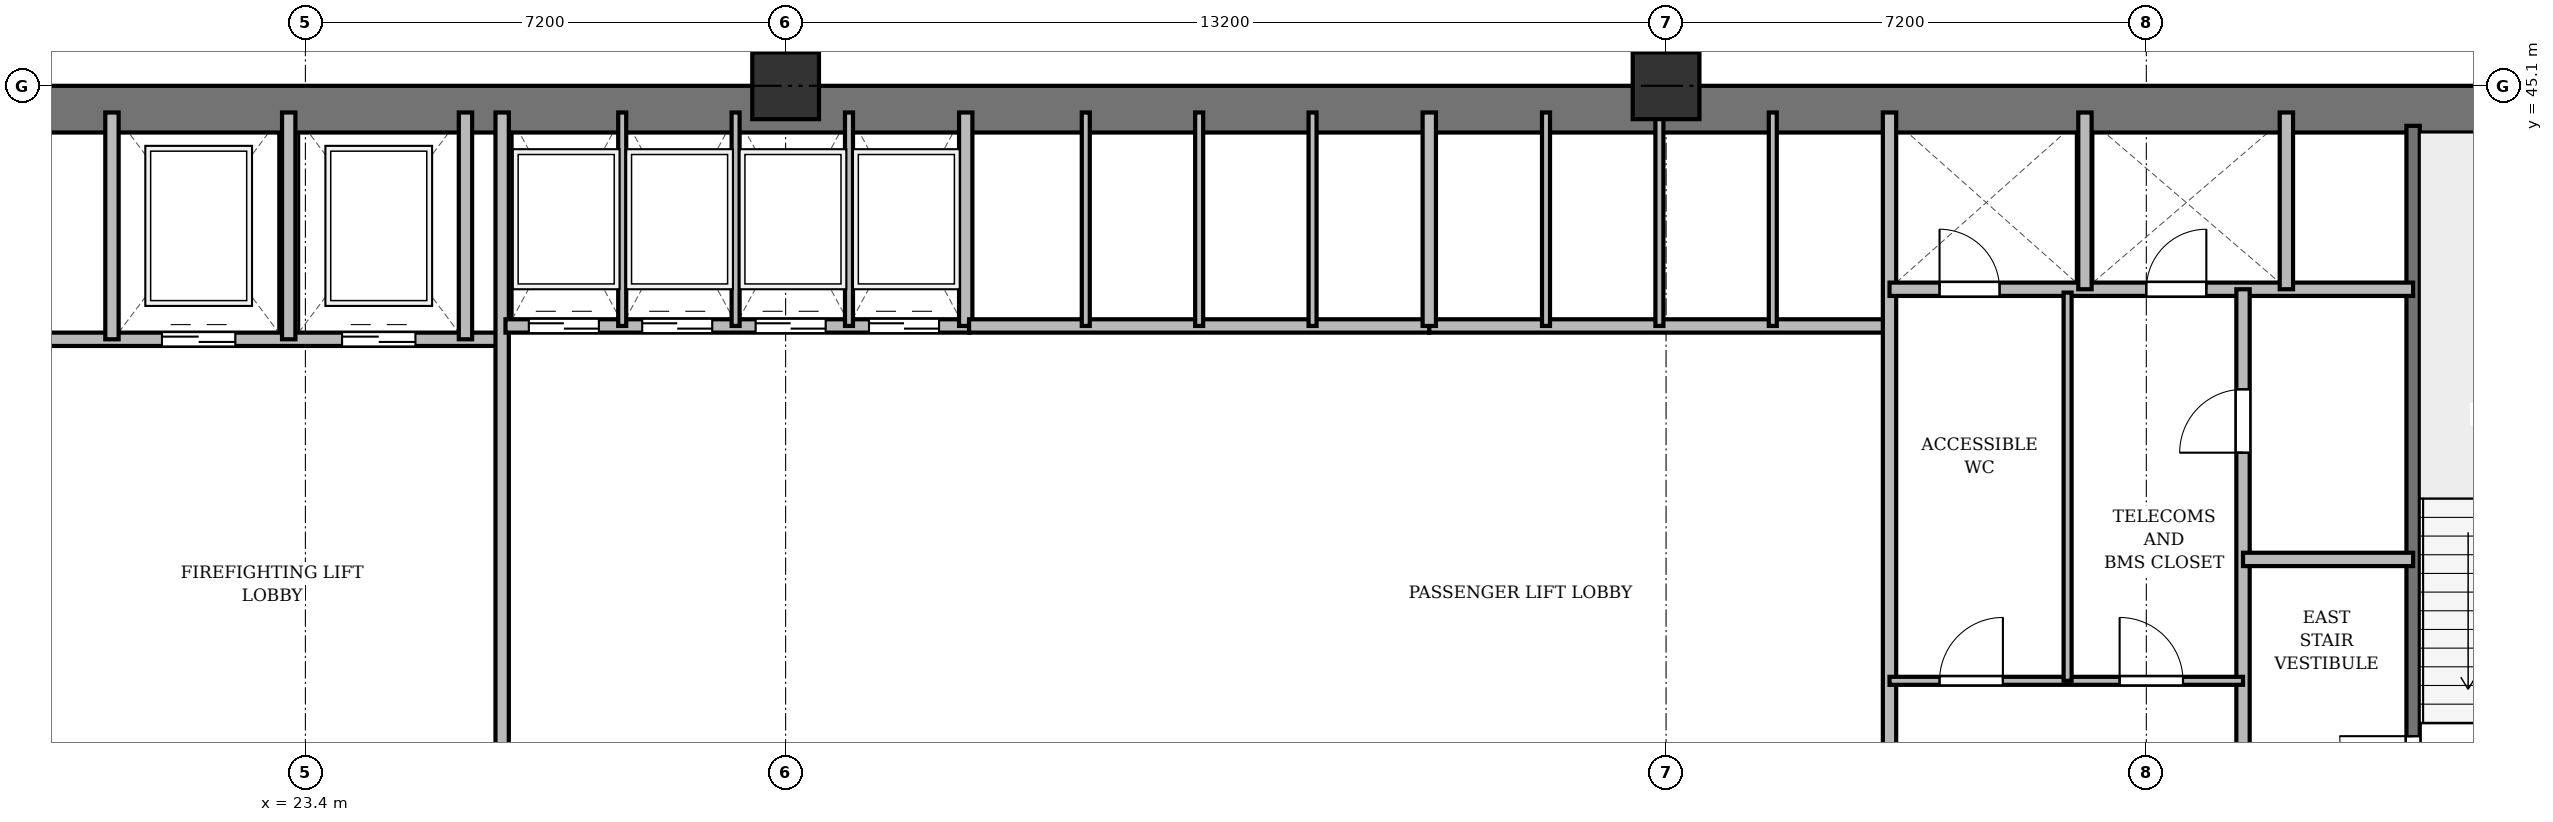
"""IFC4 building model, lengths in metres.
Left out: names, types, materials, properties, quantities, classifications, styles, units other than length and angle.
Written with IfcOpenShell. Run it as: python <this file> out.ifc"""

import sys

from ifc_helpers import new_model, si_unit, direction, frame, frame_2d, origin, origin_2d, place, context, subcontext, project, spatial, rectangle, extrude, source, transform, mapped, element, fill, save


model = new_model("IFC4")
c1 = context("Model", 3, precision=1e-05, world=origin(), true_north=direction((0.0, 1.0)))
c2 = subcontext(c1, "Body", "Model", "MODEL_VIEW")
j1 = project(units=[si_unit("LENGTHUNIT", "METRE"), si_unit("PLANEANGLEUNIT", "RADIAN")], contexts=[c1])
p1 = place(None, origin())
s1 = spatial("IfcSite", under=j1, at=p1, CompositionType="ELEMENT")
p2 = place(p1, origin())
s2 = spatial("IfcBuilding", under=s1, at=p2, CompositionType="ELEMENT")
p3 = place(p2, frame((0.0, 0.0, 14.2)))
s3 = spatial("IfcBuildingStorey", under=s2, at=p3, CompositionType="ELEMENT", Elevation=14.2)
m1 = source(origin(), c2, "Body", "SweptSolid", [
    extrude(rectangle(XDim=1.0, YDim=1.0, at=origin_2d()), origin(), (0.0, 0.0, 1.0), 4.5),
])
for number, where, z_axis, x_axis in (
    (1, (30.6, 45.1, 0.0), (0.0, 0.0, 1.0), (1.0, 0.0, 0.0)),
    (2, (43.8, 45.1, 0.0), (0.0, 0.0, 1.0), (1.0, 0.0, 0.0)),
):
    element("IfcColumn", number, at=place(p3, frame(where, z_axis=z_axis, x_axis=x_axis)), inside=s3, PredefinedType="COLUMN", context=c2, shape_type="MappedRepresentation", body=[
        mapped(m1, transform((0.0, 0.0, 0.0), x_axis=(1.0, 0.0, 0.0), y_axis=(0.0, 1.0, 0.0), z_axis=(0.0, 0.0, 1.0), scale=1.0)),
    ])
p4 = place(p3, frame((15.5, 44.75, 0.0), z_axis=(0.0, 0.0, 1.0), x_axis=(1.0, 0.0, 0.0)))
e3 = element("IfcWall", 3, at=p4, inside=s3, PredefinedType="SHEAR", context=c2, shape_type="SweptSolid", body=[
    extrude(rectangle(XDim=43.4, YDim=0.7, at=frame_2d((21.7, 0.0))), origin(), (0.0, 0.0, 1.0), 4.15),
])
p5 = place(p3, frame((55.0, 33.4, 0.0), z_axis=(0.0, 0.0, 1.0), x_axis=(0.0, 1.0, 0.0)))
e4 = element("IfcWall", 4, at=p5, inside=s3, PredefinedType="SHEAR", context=c2, shape_type="SweptSolid", body=[
    extrude(rectangle(XDim=11.1, YDim=0.2, at=frame_2d((5.55, 0.0))), origin(), (0.0, 0.0, 1.0), 4.15),
])
p6 = place(p5, frame((0.85, 0.0, 0.0)))
e5 = element("IfcOpeningElement", 5, at=p6, cuts=e4, PredefinedType="OPENING", context=c2, shape_type="SweptSolid", body=[
    extrude(rectangle(XDim=1.1, YDim=2.15, at=frame_2d((0.55, 1.075))), frame((0.0, 0.11, 0.0), z_axis=(0.0, -1.0, 0.0), x_axis=(1.0, 0.0, 0.0)), (0.0, 0.0, 1.0), 0.22),
])
p7 = place(p3, frame((19.55, 41.3, 0.0), z_axis=(0.0, 0.0, 1.0), x_axis=(1.0, 0.0, 0.0)))
e6 = element("IfcWall", 6, at=p7, inside=s3, PredefinedType="SOLIDWALL", context=c2, shape_type="SweptSolid", body=[
    extrude(rectangle(XDim=6.75, YDim=0.2, at=frame_2d((3.375, 0.0))), origin(), (0.0, 0.0, 1.0), 4.15),
])
p8 = place(p7, frame((1.7, 0.0, 0.0)))
e7 = element("IfcOpeningElement", 7, at=p8, cuts=e6, PredefinedType="OPENING", context=c2, shape_type="SweptSolid", body=[
    extrude(rectangle(XDim=1.1, YDim=2.15, at=frame_2d((0.55, 1.075))), frame((0.0, 0.11, 0.0), z_axis=(0.0, -1.0, 0.0), x_axis=(1.0, 0.0, 0.0)), (0.0, 0.0, 1.0), 0.22),
])
p9 = place(p7, frame((4.4, 0.0, 0.0)))
e8 = element("IfcOpeningElement", 8, at=p9, cuts=e6, PredefinedType="OPENING", context=c2, shape_type="SweptSolid", body=[
    extrude(rectangle(XDim=1.1, YDim=2.15, at=frame_2d((0.55, 1.075))), frame((0.0, 0.11, 0.0), z_axis=(0.0, -1.0, 0.0), x_axis=(1.0, 0.0, 0.0)), (0.0, 0.0, 1.0), 0.22),
])
for number, where, z_axis, x_axis in (
    (9, (20.5, 41.3, 0.0), (0.0, 0.0, 1.0), (0.0, 1.0, 0.0)),
    (10, (23.15, 41.3, 0.0), (0.0, 0.0, 1.0), (0.0, 1.0, 0.0)),
    (11, (25.8, 41.3, 0.0), (0.0, 0.0, 1.0), (0.0, 1.0, 0.0)),
):
    element("IfcWall", number, at=place(p3, frame(where, z_axis=z_axis, x_axis=x_axis)), inside=s3, PredefinedType="SOLIDWALL", context=c2, shape_type="SweptSolid", body=[
        extrude(rectangle(XDim=3.4, YDim=0.2, at=frame_2d((1.7, 0.0))), origin(), (0.0, 0.0, 1.0), 4.15),
    ])
p10 = place(p3, frame((26.35, 33.4, 0.0), z_axis=(0.0, 0.0, 1.0), x_axis=(0.0, 1.0, 0.0)))
e12 = element("IfcWall", 12, at=p10, inside=s3, PredefinedType="SOLIDWALL", context=c2, shape_type="SweptSolid", body=[
    extrude(rectangle(XDim=11.3, YDim=0.2, at=frame_2d((5.65, 0.0))), origin(), (0.0, 0.0, 1.0), 3.05),
])
p11 = place(p3, frame((26.4, 41.5, 0.0), z_axis=(0.0, 0.0, 1.0), x_axis=(1.0, 0.0, 0.0)))
e13 = element("IfcWall", 13, at=p11, inside=s3, PredefinedType="SOLIDWALL", context=c2, shape_type="SweptSolid", body=[
    extrude(rectangle(XDim=6.95, YDim=0.2, at=frame_2d((3.475, 0.0))), origin(), (0.0, 0.0, 1.0), 4.15),
])
p12 = place(p11, frame((0.35, 0.0, 0.0)))
e14 = element("IfcOpeningElement", 14, at=p12, cuts=e13, PredefinedType="OPENING", context=c2, shape_type="SweptSolid", body=[
    extrude(rectangle(XDim=1.05, YDim=2.15, at=frame_2d((0.525, 1.075))), frame((0.0, 0.11, 0.0), z_axis=(0.0, -1.0, 0.0), x_axis=(1.0, 0.0, 0.0)), (0.0, 0.0, 1.0), 0.22),
])
p13 = place(p11, frame((2.05, 0.0, 0.0)))
e15 = element("IfcOpeningElement", 15, at=p13, cuts=e13, PredefinedType="OPENING", context=c2, shape_type="SweptSolid", body=[
    extrude(rectangle(XDim=1.05, YDim=2.15, at=frame_2d((0.525, 1.075))), frame((0.0, 0.11, 0.0), z_axis=(0.0, -1.0, 0.0), x_axis=(1.0, 0.0, 0.0)), (0.0, 0.0, 1.0), 0.22),
])
p14 = place(p11, frame((3.75, 0.0, 0.0)))
e16 = element("IfcOpeningElement", 16, at=p14, cuts=e13, PredefinedType="OPENING", context=c2, shape_type="SweptSolid", body=[
    extrude(rectangle(XDim=1.05, YDim=2.15, at=frame_2d((0.525, 1.075))), frame((0.0, 0.11, 0.0), z_axis=(0.0, -1.0, 0.0), x_axis=(1.0, 0.0, 0.0)), (0.0, 0.0, 1.0), 0.22),
])
p15 = place(p11, frame((5.45, 0.0, 0.0)))
e17 = element("IfcOpeningElement", 17, at=p15, cuts=e13, PredefinedType="OPENING", context=c2, shape_type="SweptSolid", body=[
    extrude(rectangle(XDim=1.05, YDim=2.15, at=frame_2d((0.525, 1.075))), frame((0.0, 0.11, 0.0), z_axis=(0.0, -1.0, 0.0), x_axis=(1.0, 0.0, 0.0)), (0.0, 0.0, 1.0), 0.22),
])
p16 = place(p3, frame((33.3, 41.5, 0.0), z_axis=(0.0, 0.0, 1.0), x_axis=(0.0, 1.0, 0.0)))
e18 = element("IfcWall", 18, at=p16, inside=s3, PredefinedType="SOLIDWALL", context=c2, shape_type="SweptSolid", body=[
    extrude(rectangle(XDim=3.2, YDim=0.2, at=frame_2d((1.6, 0.0))), origin(), (0.0, 0.0, 1.0), 4.15),
])
for number, where, z_axis, x_axis in (
    (19, (28.15, 41.5, 0.0), (0.0, 0.0, 1.0), (0.0, 1.0, 0.0)),
    (20, (29.85, 41.5, 0.0), (0.0, 0.0, 1.0), (0.0, 1.0, 0.0)),
    (21, (31.55, 41.5, 0.0), (0.0, 0.0, 1.0), (0.0, 1.0, 0.0)),
):
    element("IfcWall", number, at=place(p3, frame(where, z_axis=z_axis, x_axis=x_axis)), inside=s3, PredefinedType="PARTITIONING", context=c2, shape_type="SweptSolid", body=[
        extrude(rectangle(XDim=3.2, YDim=0.12, at=frame_2d((1.6, 0.0))), origin(), (0.0, 0.0, 1.0), 4.15),
    ])
p17 = place(p3, frame((33.35, 41.5, 0.0), z_axis=(0.0, 0.0, 1.0), x_axis=(1.0, 0.0, 0.0)))
e22 = element("IfcWall", 22, at=p17, inside=s3, PredefinedType="SOLIDWALL", context=c2, shape_type="SweptSolid", body=[
    extrude(rectangle(XDim=6.9, YDim=0.2, at=frame_2d((3.45, 0.0))), origin(), (0.0, 0.0, 1.0), 4.15),
])
for number, where, z_axis, x_axis in (
    (23, (35.1, 41.5, 0.0), (0.0, 0.0, 1.0), (0.0, 1.0, 0.0)),
    (24, (36.8, 41.5, 0.0), (0.0, 0.0, 1.0), (0.0, 1.0, 0.0)),
    (25, (38.5, 41.5, 0.0), (0.0, 0.0, 1.0), (0.0, 1.0, 0.0)),
):
    element("IfcWall", number, at=place(p3, frame(where, z_axis=z_axis, x_axis=x_axis)), inside=s3, PredefinedType="PARTITIONING", context=c2, shape_type="SweptSolid", body=[
        extrude(rectangle(XDim=3.2, YDim=0.12, at=frame_2d((1.6, 0.0))), origin(), (0.0, 0.0, 1.0), 4.15),
    ])
p18 = place(p3, frame((40.25, 41.5, 0.0), z_axis=(0.0, 0.0, 1.0), x_axis=(1.0, 0.0, 0.0)))
e26 = element("IfcWall", 26, at=p18, inside=s3, PredefinedType="SOLIDWALL", context=c2, shape_type="SweptSolid", body=[
    extrude(rectangle(XDim=6.9, YDim=0.2, at=frame_2d((3.45, 0.0))), origin(), (0.0, 0.0, 1.0), 3.35),
])
p19 = place(p3, frame((40.25, 41.5, 0.0), z_axis=(0.0, 0.0, 1.0), x_axis=(0.0, 1.0, 0.0)))
e27 = element("IfcWall", 27, at=p19, inside=s3, PredefinedType="SOLIDWALL", context=c2, shape_type="SweptSolid", body=[
    extrude(rectangle(XDim=3.2, YDim=0.2, at=frame_2d((1.6, 0.0))), origin(), (0.0, 0.0, 1.0), 4.15),
])
p20 = place(p3, frame((42.0, 41.5, 0.0), z_axis=(0.0, 0.0, 1.0), x_axis=(0.0, 1.0, 0.0)))
e28 = element("IfcWall", 28, at=p20, inside=s3, PredefinedType="PARTITIONING", context=c2, shape_type="SweptSolid", body=[
    extrude(rectangle(XDim=3.2, YDim=0.12, at=frame_2d((1.6, 0.0))), origin(), (0.0, 0.0, 1.0), 4.15),
])
p21 = place(p3, frame((43.7, 41.5, 0.0), z_axis=(0.0, 0.0, 1.0), x_axis=(0.0, 1.0, 0.0)))
e29 = element("IfcWall", 29, at=p21, inside=s3, PredefinedType="PARTITIONING", context=c2, shape_type="SweptSolid", body=[
    extrude(rectangle(XDim=3.2, YDim=0.12, at=frame_2d((1.6, 0.0))), origin(), (0.0, 0.0, 1.0), 3.35),
])
p22 = place(p3, frame((45.4, 41.5, 0.0), z_axis=(0.0, 0.0, 1.0), x_axis=(0.0, 1.0, 0.0)))
e30 = element("IfcWall", 30, at=p22, inside=s3, PredefinedType="PARTITIONING", context=c2, shape_type="SweptSolid", body=[
    extrude(rectangle(XDim=3.2, YDim=0.12, at=frame_2d((1.6, 0.0))), origin(), (0.0, 0.0, 1.0), 4.15),
])
p23 = place(p3, frame((47.15, 33.4, 0.0), z_axis=(0.0, 0.0, 1.0), x_axis=(0.0, 1.0, 0.0)))
e31 = element("IfcWall", 31, at=p23, inside=s3, PredefinedType="SOLIDWALL", context=c2, shape_type="SweptSolid", body=[
    extrude(rectangle(XDim=11.3, YDim=0.2, at=frame_2d((5.65, 0.0))), origin(), (0.0, 0.0, 1.0), 3.05),
])
p24 = place(p3, frame((47.15, 42.05, 0.0), z_axis=(0.0, 0.0, 1.0), x_axis=(1.0, 0.0, 0.0)))
e32 = element("IfcWall", 32, at=p24, inside=s3, PredefinedType="SOLIDWALL", context=c2, shape_type="SweptSolid", body=[
    extrude(rectangle(XDim=7.85, YDim=0.2, at=frame_2d((3.925, 0.0))), origin(), (0.0, 0.0, 1.0), 4.15),
])
p25 = place(p24, frame((0.75, 0.0, 0.0)))
e33 = element("IfcOpeningElement", 33, at=p25, cuts=e32, PredefinedType="OPENING", context=c2, shape_type="SweptSolid", body=[
    extrude(rectangle(XDim=0.9, YDim=2.1, at=frame_2d((0.45, 1.05))), frame((0.0, 0.11, 0.0), z_axis=(0.0, -1.0, 0.0), x_axis=(1.0, 0.0, 0.0)), (0.0, 0.0, 1.0), 0.22),
])
p26 = place(p24, frame((3.85, 0.0, 0.0)))
e34 = element("IfcOpeningElement", 34, at=p26, cuts=e32, PredefinedType="OPENING", context=c2, shape_type="SweptSolid", body=[
    extrude(rectangle(XDim=0.9, YDim=2.1, at=frame_2d((0.45, 1.05))), frame((0.0, 0.11, 0.0), z_axis=(0.0, -1.0, 0.0), x_axis=(1.0, 0.0, 0.0)), (0.0, 0.0, 1.0), 0.22),
])
for number, where, z_axis, x_axis in (
    (35, (50.08, 42.05, 0.0), (0.0, 0.0, 1.0), (0.0, 1.0, 0.0)),
    (36, (53.1, 42.05, 0.0), (0.0, 0.0, 1.0), (0.0, 1.0, 0.0)),
):
    element("IfcWall", number, at=place(p3, frame(where, z_axis=z_axis, x_axis=x_axis)), inside=s3, PredefinedType="SOLIDWALL", context=c2, shape_type="SweptSolid", body=[
        extrude(rectangle(XDim=2.65, YDim=0.2, at=frame_2d((1.325, 0.0))), origin(), (0.0, 0.0, 1.0), 4.15),
    ])
p27 = place(p3, frame((52.45, 33.4, 0.0), z_axis=(0.0, 0.0, 1.0), x_axis=(0.0, 1.0, 0.0)))
e37 = element("IfcWall", 37, at=p27, inside=s3, PredefinedType="PARTITIONING", context=c2, shape_type="SweptSolid", body=[
    extrude(rectangle(XDim=8.65, YDim=0.2, at=frame_2d((4.325, 0.0))), origin(), (0.0, 0.0, 1.0), 3.05),
])
p28 = place(p27, frame((6.2, 0.0, 0.0)))
e38 = element("IfcOpeningElement", 38, at=p28, cuts=e37, PredefinedType="OPENING", context=c2, shape_type="SweptSolid", body=[
    extrude(rectangle(XDim=0.95, YDim=2.15, at=frame_2d((0.475, 1.075))), frame((0.0, 0.11, 0.0), z_axis=(0.0, -1.0, 0.0), x_axis=(1.0, 0.0, 0.0)), (0.0, 0.0, 1.0), 0.22),
])
p29 = place(p3, frame((52.45, 38.0, 0.0), z_axis=(0.0, 0.0, 1.0), x_axis=(1.0, 0.0, 0.0)))
e39 = element("IfcWall", 39, at=p29, inside=s3, PredefinedType="PARTITIONING", context=c2, shape_type="SweptSolid", body=[
    extrude(rectangle(XDim=2.55, YDim=0.2, at=frame_2d((1.275, 0.0))), origin(), (0.0, 0.0, 1.0), 4.15),
])
p30 = place(p3, frame((47.15, 36.18, 0.0), z_axis=(0.0, 0.0, 1.0), x_axis=(1.0, 0.0, 0.0)))
e40 = element("IfcWall", 40, at=p30, inside=s3, PredefinedType="PARTITIONING", context=c2, shape_type="SweptSolid", body=[
    extrude(rectangle(XDim=5.3, YDim=0.12, at=frame_2d((2.65, 0.0))), origin(), (0.0, 0.0, 1.0), 4.15),
])
p31 = place(p30, frame((0.75, 0.0, 0.0)))
e41 = element("IfcOpeningElement", 41, at=p31, cuts=e40, PredefinedType="OPENING", context=c2, shape_type="SweptSolid", body=[
    extrude(rectangle(XDim=0.95, YDim=2.15, at=frame_2d((0.475, 1.075))), frame((0.0, 0.07, 0.0), z_axis=(0.0, -1.0, 0.0), x_axis=(1.0, 0.0, 0.0)), (0.0, 0.0, 1.0), 0.14),
])
p32 = place(p30, frame((3.45, 0.0, 0.0)))
e42 = element("IfcOpeningElement", 42, at=p32, cuts=e40, PredefinedType="OPENING", context=c2, shape_type="SweptSolid", body=[
    extrude(rectangle(XDim=0.95, YDim=2.15, at=frame_2d((0.475, 1.075))), frame((0.0, 0.07, 0.0), z_axis=(0.0, -1.0, 0.0), x_axis=(1.0, 0.0, 0.0)), (0.0, 0.0, 1.0), 0.14),
])
p33 = place(p3, frame((49.82, 36.18, 0.0), z_axis=(0.0, 0.0, 1.0), x_axis=(0.0, 1.0, 0.0)))
e43 = element("IfcWall", 43, at=p33, inside=s3, PredefinedType="PARTITIONING", context=c2, shape_type="SweptSolid", body=[
    extrude(rectangle(XDim=5.82, YDim=0.12, at=frame_2d((2.91, 0.0))), origin(), (0.0, 0.0, 1.0), 4.15),
])
m2 = source(origin(), c2, "Body", "SweptSolid", [
    extrude(rectangle(XDim=1.1, YDim=2.15, at=frame_2d((0.55, 1.075))), frame((0.0, 0.025, 0.0), z_axis=(0.0, -1.0, 0.0), x_axis=(1.0, 0.0, 0.0)), (0.0, 0.0, 1.0), 0.05),
])
p34 = place(p6, origin())
e44 = element("IfcDoor", 44, at=p34, inside=s3, OperationType="SINGLE_SWING_RIGHT", PredefinedType="DOOR", context=c2, shape_type="MappedRepresentation", body=[
    mapped(m2, transform((0.0, 0.0, 0.0), x_axis=(1.0, 0.0, 0.0), y_axis=(0.0, 1.0, 0.0), z_axis=(0.0, 0.0, 1.0), scale=1.0)),
])
fill(e5, e44)
p35 = place(p8, origin())
e45 = element("IfcDoor", 45, at=p35, inside=s3, OperationType="DOUBLE_DOOR_SLIDING", PredefinedType="DOOR", context=c2, shape_type="MappedRepresentation", body=[
    mapped(m2, transform((0.0, 0.0, 0.0), x_axis=(1.0, 0.0, 0.0), y_axis=(0.0, 1.0, 0.0), z_axis=(0.0, 0.0, 1.0), scale=1.0)),
])
fill(e7, e45)
p36 = place(p9, origin())
e46 = element("IfcDoor", 46, at=p36, inside=s3, OperationType="DOUBLE_DOOR_SLIDING", PredefinedType="DOOR", context=c2, shape_type="MappedRepresentation", body=[
    mapped(m2, transform((0.0, 0.0, 0.0), x_axis=(1.0, 0.0, 0.0), y_axis=(0.0, 1.0, 0.0), z_axis=(0.0, 0.0, 1.0), scale=1.0)),
])
fill(e8, e46)
m3 = source(origin(), c2, "Body", "SweptSolid", [
    extrude(rectangle(XDim=1.05, YDim=2.15, at=frame_2d((0.525, 1.075))), frame((0.0, 0.025, 0.0), z_axis=(0.0, -1.0, 0.0), x_axis=(1.0, 0.0, 0.0)), (0.0, 0.0, 1.0), 0.05),
])
p37 = place(p12, origin())
e47 = element("IfcDoor", 47, at=p37, inside=s3, OperationType="DOUBLE_DOOR_SLIDING", PredefinedType="DOOR", context=c2, shape_type="MappedRepresentation", body=[
    mapped(m3, transform((0.0, 0.0, 0.0), x_axis=(1.0, 0.0, 0.0), y_axis=(0.0, 1.0, 0.0), z_axis=(0.0, 0.0, 1.0), scale=1.0)),
])
fill(e14, e47)
p38 = place(p13, origin())
e48 = element("IfcDoor", 48, at=p38, inside=s3, OperationType="DOUBLE_DOOR_SLIDING", PredefinedType="DOOR", context=c2, shape_type="MappedRepresentation", body=[
    mapped(m3, transform((0.0, 0.0, 0.0), x_axis=(1.0, 0.0, 0.0), y_axis=(0.0, 1.0, 0.0), z_axis=(0.0, 0.0, 1.0), scale=1.0)),
])
fill(e15, e48)
p39 = place(p14, origin())
e49 = element("IfcDoor", 49, at=p39, inside=s3, OperationType="DOUBLE_DOOR_SLIDING", PredefinedType="DOOR", context=c2, shape_type="MappedRepresentation", body=[
    mapped(m3, transform((0.0, 0.0, 0.0), x_axis=(1.0, 0.0, 0.0), y_axis=(0.0, 1.0, 0.0), z_axis=(0.0, 0.0, 1.0), scale=1.0)),
])
fill(e16, e49)
p40 = place(p15, origin())
e50 = element("IfcDoor", 50, at=p40, inside=s3, OperationType="DOUBLE_DOOR_SLIDING", PredefinedType="DOOR", context=c2, shape_type="MappedRepresentation", body=[
    mapped(m3, transform((0.0, 0.0, 0.0), x_axis=(1.0, 0.0, 0.0), y_axis=(0.0, 1.0, 0.0), z_axis=(0.0, 0.0, 1.0), scale=1.0)),
])
fill(e17, e50)
m4 = source(origin(), c2, "Body", "SweptSolid", [
    extrude(rectangle(XDim=0.9, YDim=2.1, at=frame_2d((0.45, 1.05))), frame((0.0, 0.025, 0.0), z_axis=(0.0, -1.0, 0.0), x_axis=(1.0, 0.0, 0.0)), (0.0, 0.0, 1.0), 0.05),
])
p41 = place(p25, origin())
e51 = element("IfcDoor", 51, at=p41, inside=s3, OperationType="SINGLE_SWING_LEFT", PredefinedType="DOOR", context=c2, shape_type="MappedRepresentation", body=[
    mapped(m4, transform((0.0, 0.0, 0.0), x_axis=(1.0, 0.0, 0.0), y_axis=(0.0, 1.0, 0.0), z_axis=(0.0, 0.0, 1.0), scale=1.0)),
])
fill(e33, e51)
p42 = place(p26, origin())
e52 = element("IfcDoor", 52, at=p42, inside=s3, OperationType="SINGLE_SWING_RIGHT", PredefinedType="DOOR", context=c2, shape_type="MappedRepresentation", body=[
    mapped(m4, transform((0.0, 0.0, 0.0), x_axis=(1.0, 0.0, 0.0), y_axis=(0.0, 1.0, 0.0), z_axis=(0.0, 0.0, 1.0), scale=1.0)),
])
fill(e34, e52)
m5 = source(origin(), c2, "Body", "SweptSolid", [
    extrude(rectangle(XDim=0.95, YDim=2.15, at=frame_2d((0.475, 1.075))), frame((0.0, 0.025, 0.0), z_axis=(0.0, -1.0, 0.0), x_axis=(1.0, 0.0, 0.0)), (0.0, 0.0, 1.0), 0.05),
])
p43 = place(p28, origin())
e53 = element("IfcDoor", 53, at=p43, inside=s3, OperationType="SINGLE_SWING_LEFT", PredefinedType="DOOR", context=c2, shape_type="MappedRepresentation", body=[
    mapped(m5, transform((0.0, 0.0, 0.0), x_axis=(1.0, 0.0, 0.0), y_axis=(0.0, 1.0, 0.0), z_axis=(0.0, 0.0, 1.0), scale=1.0)),
])
fill(e38, e53)
p44 = place(p31, origin())
e54 = element("IfcDoor", 54, at=p44, inside=s3, OperationType="SINGLE_SWING_RIGHT", PredefinedType="DOOR", context=c2, shape_type="MappedRepresentation", body=[
    mapped(m5, transform((0.0, 0.0, 0.0), x_axis=(1.0, 0.0, 0.0), y_axis=(0.0, 1.0, 0.0), z_axis=(0.0, 0.0, 1.0), scale=1.0)),
])
fill(e41, e54)
p45 = place(p32, origin())
e55 = element("IfcDoor", 55, at=p45, inside=s3, OperationType="SINGLE_SWING_LEFT", PredefinedType="DOOR", context=c2, shape_type="MappedRepresentation", body=[
    mapped(m5, transform((0.0, 0.0, 0.0), x_axis=(1.0, 0.0, 0.0), y_axis=(0.0, 1.0, 0.0), z_axis=(0.0, 0.0, 1.0), scale=1.0)),
])
fill(e42, e55)
save(model, sys.argv[1])
